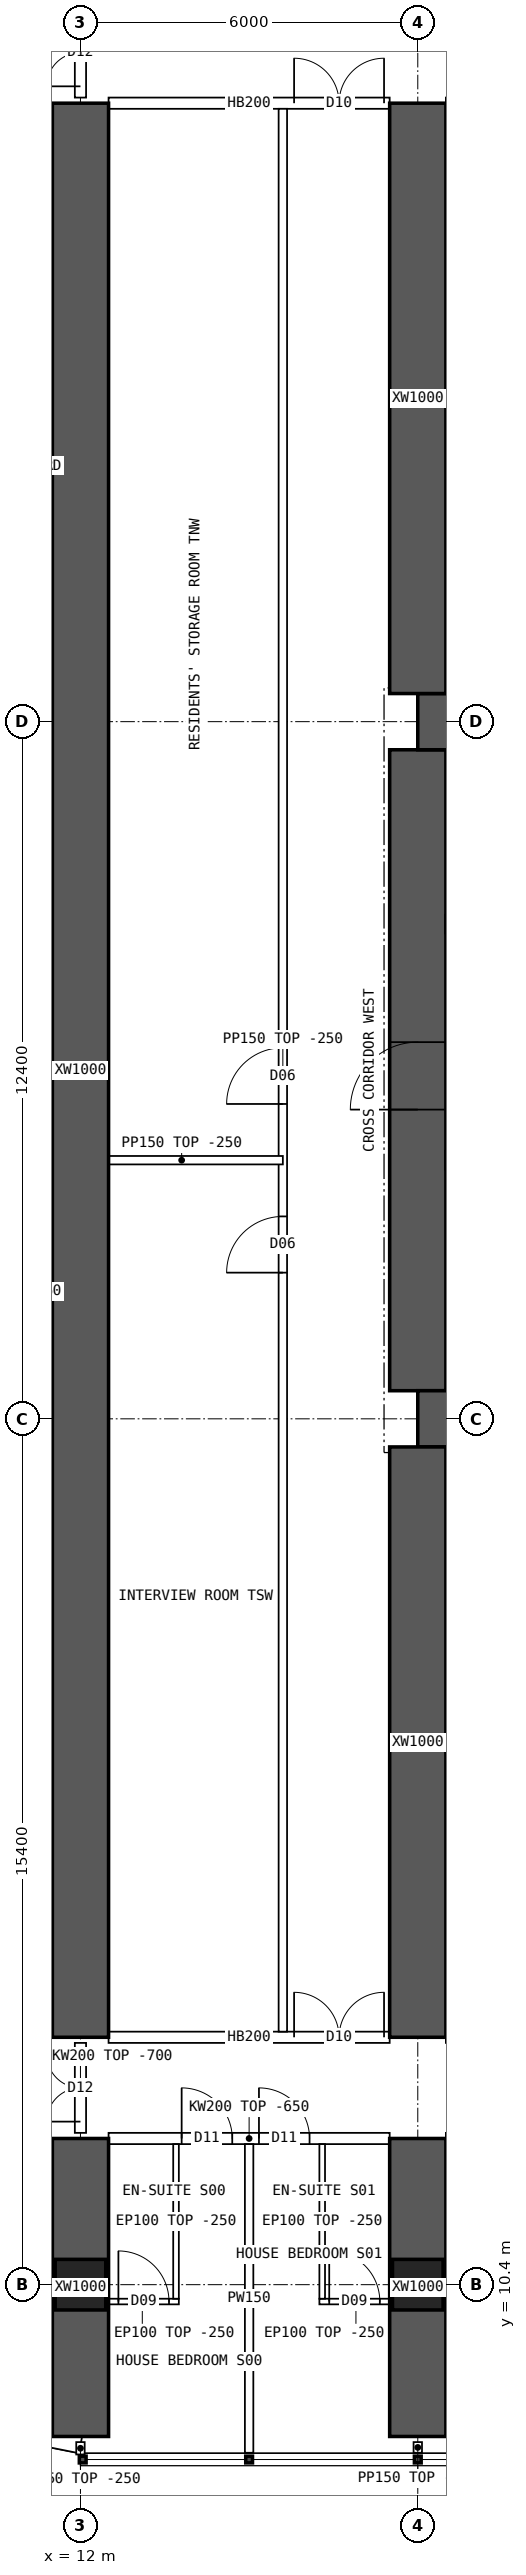
"""IFC4 building model, lengths in metres.
Left out: names, types, materials, properties, quantities, classifications, styles, units other than length and angle.
Written with IfcOpenShell. Run it as: python <this file> out.ifc"""

import sys

from ifc_helpers import new_model, si_unit, direction, frame, frame_2d, origin, origin_2d, place, context, subcontext, project, spatial, polyline, rectangle, hollow_rectangle, outline, extrude, element, fill, save


model = new_model("IFC4")
c1 = context("Model", 3, precision=1e-05, world=origin(), true_north=direction((0.0, 1.0)))
c2 = subcontext(c1, "Body", "Model", "MODEL_VIEW")
j1 = project(units=[si_unit("LENGTHUNIT", "METRE"), si_unit("PLANEANGLEUNIT", "RADIAN")], contexts=[c1])
p1 = place(None, origin())
s1 = spatial("IfcSite", under=j1, at=p1, CompositionType="ELEMENT")
p2 = place(p1, origin())
s2 = spatial("IfcBuilding", under=s1, at=p2, CompositionType="ELEMENT")
p3 = place(p2, frame((0.0, 0.0, 42.7)))
s3 = spatial("IfcBuildingStorey", under=s2, at=p3, CompositionType="ELEMENT", Elevation=42.7)
for number, where, z_axis, x_axis in (
    (1, (12.0, 10.4, 0.0), (0.0, 0.0, 1.0), (1.0, 0.0, 0.0)),
    (2, (18.0, 10.4, 0.0), (0.0, 0.0, 1.0), (1.0, 0.0, 0.0)),
):
    element("IfcColumn", number, at=place(p3, frame(where, z_axis=z_axis, x_axis=x_axis)), inside=s3, PredefinedType="COLUMN", context=c2, shape_type="SweptSolid", body=[
        extrude(hollow_rectangle(XDim=0.9, YDim=0.9, WallThickness=0.09, at=origin_2d()), origin(), (0.0, 0.0, 1.0), 3.75),
    ])
for number, where, z_axis, x_axis in (
    (3, (18.0, 25.8, 0.0), (0.0, 0.0, 1.0), (1.0, 0.0, 0.0)),
    (4, (18.0, 38.2, 0.0), (0.0, 0.0, 1.0), (1.0, 0.0, 0.0)),
):
    element("IfcWall", number, at=place(p3, frame(where, z_axis=z_axis, x_axis=x_axis)), inside=s3, PredefinedType="SHEAR", context=c2, shape_type="SweptSolid", body=[
        extrude(rectangle(XDim=48.0, YDim=1.0, at=frame_2d((24.0, 0.0))), origin(), (0.0, 0.0, 1.0), 3.75),
    ])
p4 = place(p3, frame((18.0, 26.3, 0.0), z_axis=(0.0, 0.0, 1.0), x_axis=(0.0, 1.0, 0.0)))
e5 = element("IfcWall", 5, at=p4, inside=s3, PredefinedType="SHEAR", context=c2, shape_type="SweptSolid", body=[
    extrude(rectangle(XDim=11.4, YDim=1.0, at=frame_2d((5.7, 0.0))), origin(), (0.0, 0.0, 1.0), 3.75),
])
p5 = place(p4, frame((5.0, 0.0, 0.0)))
e6 = element("IfcOpeningElement", 6, at=p5, cuts=e5, PredefinedType="OPENING", context=c2, shape_type="SweptSolid", body=[
    extrude(rectangle(XDim=1.2, YDim=2.1, at=frame_2d((0.6, 1.05))), frame((0.0, 0.51, 0.0), z_axis=(0.0, -1.0, 0.0), x_axis=(1.0, 0.0, 0.0)), (0.0, 0.0, 1.0), 1.02),
])
p6 = place(p3, frame((12.0, 7.7, 0.0), z_axis=(0.0, 0.0, 1.0), x_axis=(0.0, 1.0, 0.0)))
e7 = element("IfcWall", 7, at=p6, inside=s3, PredefinedType="SHEAR", context=c2, shape_type="SweptSolid", body=[
    extrude(rectangle(XDim=5.3, YDim=1.0, at=frame_2d((2.65, 0.0))), origin(), (0.0, 0.0, 1.0), 3.75),
])
p7 = place(p3, frame((12.0, 14.8, 0.0), z_axis=(0.0, 0.0, 1.0), x_axis=(0.0, 1.0, 0.0)))
e8 = element("IfcWall", 8, at=p7, inside=s3, PredefinedType="SHEAR", context=c2, shape_type="SweptSolid", body=[
    extrude(rectangle(XDim=34.4, YDim=1.0, at=frame_2d((17.2, 0.0))), origin(), (0.0, 0.0, 1.0), 3.75),
])
p8 = place(p3, frame((18.0, 7.7, 0.0), z_axis=(0.0, 0.0, 1.0), x_axis=(0.0, 1.0, 0.0)))
e9 = element("IfcWall", 9, at=p8, inside=s3, PredefinedType="SHEAR", context=c2, shape_type="SweptSolid", body=[
    extrude(rectangle(XDim=5.3, YDim=1.0, at=frame_2d((2.65, 0.0))), origin(), (0.0, 0.0, 1.0), 3.75),
])
for number, where, z_axis, x_axis in (
    (10, (18.0, 14.8, 0.0), (0.0, 0.0, 1.0), (0.0, 1.0, 0.0)),
    (11, (18.0, 38.7, 0.0), (0.0, 0.0, 1.0), (0.0, 1.0, 0.0)),
):
    element("IfcWall", number, at=place(p3, frame(where, z_axis=z_axis, x_axis=x_axis)), inside=s3, PredefinedType="SHEAR", context=c2, shape_type="SweptSolid", body=[
        extrude(rectangle(XDim=10.5, YDim=1.0, at=frame_2d((5.25, 0.0))), origin(), (0.0, 0.0, 1.0), 3.75),
    ])
p9 = place(p3, frame((8.843, 8.178, 0.0), z_axis=(0.0, 0.0, 1.0), x_axis=(0.980787251524, -0.195080412259, 0.0)))
e12 = element("IfcWall", 12, at=p9, inside=s3, PredefinedType="SOLIDWALL", context=c2, shape_type="SweptSolid", body=[
    extrude(outline(polyline([(-0.03, -0.15), (3.249, -0.15), (3.189, 0.15), (0.03, 0.15), (-0.03, -0.15)])), origin(), (0.0, 0.0, 1.0), 3.5),
])
p10 = place(p9, frame((0.909, 0.0, 0.9)))
e13 = element("IfcOpeningElement", 13, at=p10, cuts=e12, PredefinedType="OPENING", context=c2, shape_type="SweptSolid", body=[
    extrude(rectangle(XDim=1.4, YDim=1.8, at=frame_2d((0.7, 0.9))), frame((0.0, 0.16, 0.0), z_axis=(0.0, -1.0, 0.0), x_axis=(1.0, 0.0, 0.0)), (0.0, 0.0, 1.0), 0.32),
])
p11 = place(p3, frame((12.5, 13.0, 0.0), z_axis=(0.0, 0.0, 1.0), x_axis=(1.0, 0.0, 0.0)))
e14 = element("IfcWall", 14, at=p11, inside=s3, PredefinedType="SOLIDWALL", context=c2, shape_type="SweptSolid", body=[
    extrude(outline(polyline([(0.0, 0.0), (5.0, 0.0), (5.0, 3.1), (0.0, 3.1), (0.0, 0.0)])), frame((0.0, 0.1, 0.0), z_axis=(0.0, -1.0, 0.0), x_axis=(1.0, 0.0, 0.0)), (0.0, 0.0, 1.0), 0.2),
])
p12 = place(p11, frame((1.3, 0.0, 0.0)))
e15 = element("IfcOpeningElement", 15, at=p12, cuts=e14, PredefinedType="OPENING", context=c2, shape_type="SweptSolid", body=[
    extrude(rectangle(XDim=0.9, YDim=2.1, at=frame_2d((0.45, 1.05))), frame((0.0, 0.11, 0.0), z_axis=(0.0, -1.0, 0.0), x_axis=(1.0, 0.0, 0.0)), (0.0, 0.0, 1.0), 0.22),
])
p13 = place(p11, frame((2.675, 0.0, 0.0)))
e16 = element("IfcOpeningElement", 16, at=p13, cuts=e14, PredefinedType="OPENING", context=c2, shape_type="SweptSolid", body=[
    extrude(rectangle(XDim=0.9, YDim=2.1, at=frame_2d((0.45, 1.05))), frame((0.0, 0.11, 0.0), z_axis=(0.0, -1.0, 0.0), x_axis=(1.0, 0.0, 0.0)), (0.0, 0.0, 1.0), 0.22),
])
p14 = place(p3, frame((12.5, 14.8, 0.0), z_axis=(0.0, 0.0, 1.0), x_axis=(1.0, 0.0, 0.0)))
e17 = element("IfcWall", 17, at=p14, inside=s3, PredefinedType="SOLIDWALL", context=c2, shape_type="SweptSolid", body=[
    extrude(rectangle(XDim=5.0, YDim=0.2, at=frame_2d((2.5, 0.0))), origin(), (0.0, 0.0, 1.0), 3.5),
])
p15 = place(p14, frame((3.3, 0.0, 0.0)))
e18 = element("IfcOpeningElement", 18, at=p15, cuts=e17, PredefinedType="OPENING", context=c2, shape_type="SweptSolid", body=[
    extrude(rectangle(XDim=1.6, YDim=2.1, at=frame_2d((0.8, 1.05))), frame((0.0, 0.11, 0.0), z_axis=(0.0, -1.0, 0.0), x_axis=(1.0, 0.0, 0.0)), (0.0, 0.0, 1.0), 0.22),
])
p16 = place(p3, frame((12.5, 49.2, 0.0), z_axis=(0.0, 0.0, 1.0), x_axis=(1.0, 0.0, 0.0)))
e19 = element("IfcWall", 19, at=p16, inside=s3, PredefinedType="SOLIDWALL", context=c2, shape_type="SweptSolid", body=[
    extrude(rectangle(XDim=5.0, YDim=0.2, at=frame_2d((2.5, 0.0))), origin(), (0.0, 0.0, 1.0), 3.5),
])
p17 = place(p16, frame((3.3, 0.0, 0.0)))
e20 = element("IfcOpeningElement", 20, at=p17, cuts=e19, PredefinedType="OPENING", context=c2, shape_type="SweptSolid", body=[
    extrude(rectangle(XDim=1.6, YDim=2.1, at=frame_2d((0.8, 1.05))), frame((0.0, 0.11, 0.0), z_axis=(0.0, -1.0, 0.0), x_axis=(1.0, 0.0, 0.0)), (0.0, 0.0, 1.0), 0.22),
])
p18 = place(p3, frame((15.0, 7.41, 0.0), z_axis=(0.0, 0.0, 1.0), x_axis=(0.0, 1.0, 0.0)))
e21 = element("IfcWall", 21, at=p18, inside=s3, PredefinedType="PARTITIONING", context=c2, shape_type="SweptSolid", body=[
    extrude(outline(polyline([(0.0, 0.0), (5.49, 0.0), (5.49, 3.1), (5.442, 3.1), (5.44, 3.5), (3.192, 3.5), (3.19, 3.1), (2.792, 3.1), (2.79, 3.5), (0.0, 3.5), (0.0, 0.0)])), frame((0.0, 0.075, 0.0), z_axis=(0.0, -1.0, 0.0), x_axis=(1.0, 0.0, 0.0)), (0.0, 0.0, 1.0), 0.15),
])
p19 = place(p3, frame((13.75, 10.1, 0.0), z_axis=(0.0, 0.0, 1.0), x_axis=(-1.0, 0.0, 0.0)))
e22 = element("IfcWall", 22, at=p19, inside=s3, PredefinedType="PARTITIONING", context=c2, shape_type="SweptSolid", body=[
    extrude(rectangle(XDim=1.3, YDim=0.1, at=frame_2d((0.65, 0.0))), origin(), (0.0, 0.0, 1.0), 3.5),
])
p20 = place(p19, frame((0.175, 0.0, 0.0)))
e23 = element("IfcOpeningElement", 23, at=p20, cuts=e22, PredefinedType="OPENING", context=c2, shape_type="SweptSolid", body=[
    extrude(rectangle(XDim=0.9, YDim=2.1, at=frame_2d((0.45, 1.05))), frame((0.0, 0.06, 0.0), z_axis=(0.0, -1.0, 0.0), x_axis=(1.0, 0.0, 0.0)), (0.0, 0.0, 1.0), 0.12),
])
p21 = place(p3, frame((13.7, 10.15, 0.0), z_axis=(0.0, 0.0, 1.0), x_axis=(0.0, 1.0, 0.0)))
e24 = element("IfcWall", 24, at=p21, inside=s3, PredefinedType="PARTITIONING", context=c2, shape_type="SweptSolid", body=[
    extrude(outline(polyline([(0.0, 0.0), (2.75, 0.0), (2.75, 3.1), (2.702, 3.1), (2.7, 3.5), (0.452, 3.5), (0.45, 3.1), (0.052, 3.1), (0.05, 3.5), (0.0, 3.5), (0.0, 0.0)])), frame((0.0, 0.05, 0.0), z_axis=(0.0, -1.0, 0.0), x_axis=(1.0, 0.0, 0.0)), (0.0, 0.0, 1.0), 0.1),
])
p22 = place(p3, frame((17.55, 10.1, 0.0), z_axis=(0.0, 0.0, 1.0), x_axis=(-1.0, 0.0, 0.0)))
e25 = element("IfcWall", 25, at=p22, inside=s3, PredefinedType="PARTITIONING", context=c2, shape_type="SweptSolid", body=[
    extrude(rectangle(XDim=1.3, YDim=0.1, at=frame_2d((0.65, 0.0))), origin(), (0.0, 0.0, 1.0), 3.5),
])
p23 = place(p22, frame((0.225, 0.0, 0.0)))
e26 = element("IfcOpeningElement", 26, at=p23, cuts=e25, PredefinedType="OPENING", context=c2, shape_type="SweptSolid", body=[
    extrude(rectangle(XDim=0.9, YDim=2.1, at=frame_2d((0.45, 1.05))), frame((0.0, 0.06, 0.0), z_axis=(0.0, -1.0, 0.0), x_axis=(1.0, 0.0, 0.0)), (0.0, 0.0, 1.0), 0.12),
])
p24 = place(p3, frame((16.3, 10.15, 0.0), z_axis=(0.0, 0.0, 1.0), x_axis=(0.0, 1.0, 0.0)))
e27 = element("IfcWall", 27, at=p24, inside=s3, PredefinedType="PARTITIONING", context=c2, shape_type="SweptSolid", body=[
    extrude(outline(polyline([(0.0, 0.0), (2.75, 0.0), (2.75, 3.1), (2.702, 3.1), (2.7, 3.5), (0.452, 3.5), (0.45, 3.1), (0.052, 3.1), (0.05, 3.5), (0.0, 3.5), (0.0, 0.0)])), frame((0.0, 0.05, 0.0), z_axis=(0.0, -1.0, 0.0), x_axis=(1.0, 0.0, 0.0)), (0.0, 0.0, 1.0), 0.1),
])
p25 = place(p3, frame((15.6, 14.9, 0.0), z_axis=(0.0, 0.0, 1.0), x_axis=(0.0, 1.0, 0.0)))
e28 = element("IfcWall", 28, at=p25, inside=s3, PredefinedType="PARTITIONING", context=c2, shape_type="SweptSolid", body=[
    extrude(rectangle(XDim=34.2, YDim=0.15, at=frame_2d((17.1, 0.0))), origin(), (0.0, 0.0, 1.0), 3.5),
])
p26 = place(p25, frame((13.5, 0.0, 0.0)))
e29 = element("IfcOpeningElement", 29, at=p26, cuts=e28, PredefinedType="OPENING", context=c2, shape_type="SweptSolid", body=[
    extrude(rectangle(XDim=1.0, YDim=2.1, at=frame_2d((0.5, 1.05))), frame((0.0, 0.085, 0.0), z_axis=(0.0, -1.0, 0.0), x_axis=(1.0, 0.0, 0.0)), (0.0, 0.0, 1.0), 0.17),
])
p27 = place(p25, frame((16.5, 0.0, 0.0)))
e30 = element("IfcOpeningElement", 30, at=p27, cuts=e28, PredefinedType="OPENING", context=c2, shape_type="SweptSolid", body=[
    extrude(rectangle(XDim=1.0, YDim=2.1, at=frame_2d((0.5, 1.05))), frame((0.0, 0.085, 0.0), z_axis=(0.0, -1.0, 0.0), x_axis=(1.0, 0.0, 0.0)), (0.0, 0.0, 1.0), 0.17),
])
p28 = place(p3, frame((12.0, 30.4, 0.0), z_axis=(0.0, 0.0, 1.0), x_axis=(1.0, 0.0, 0.0)))
e31 = element("IfcWall", 31, at=p28, inside=s3, PredefinedType="PARTITIONING", context=c2, shape_type="SweptSolid", body=[
    extrude(rectangle(XDim=3.6, YDim=0.15, at=frame_2d((1.8, 0.0))), origin(), (0.0, 0.0, 1.0), 3.5),
])
p29 = place(p3, frame((3.905, 30.85, 0.0), z_axis=(0.0, 0.0, 1.0), x_axis=(1.0, 0.0, 0.0)))
e32 = element("IfcWall", 32, at=p29, inside=s3, PredefinedType="PARTITIONING", context=c2, shape_type="SweptSolid", body=[
    extrude(outline(polyline([(0.0, 0.0), (8.02, 0.0), (8.02, 3.5), (2.397, 3.5), (2.395, 3.05), (1.797, 3.05), (1.795, 3.5), (0.0, 3.5), (0.0, 0.0)])), frame((0.0, 0.075, 0.0), z_axis=(0.0, -1.0, 0.0), x_axis=(1.0, 0.0, 0.0)), (0.0, 0.0, 1.0), 0.15),
])
p30 = place(p3, frame((12.0, 13.1, 0.0), z_axis=(0.0, 0.0, 1.0), x_axis=(0.0, 1.0, 0.0)))
e33 = element("IfcWall", 33, at=p30, inside=s3, PredefinedType="SOLIDWALL", context=c2, shape_type="SweptSolid", body=[
    extrude(outline(polyline([(0.0, 0.0), (1.6, 0.0), (1.6, 3.05), (0.0, 3.05), (0.0, 0.0)])), frame((0.0, 0.1, 0.0), z_axis=(0.0, -1.0, 0.0), x_axis=(1.0, 0.0, 0.0)), (0.0, 0.0, 1.0), 0.2),
])
p31 = place(p30, frame((0.2, 0.0, 0.0)))
e34 = element("IfcOpeningElement", 34, at=p31, cuts=e33, PredefinedType="OPENING", context=c2, shape_type="SweptSolid", body=[
    extrude(rectangle(XDim=1.2, YDim=2.1, at=frame_2d((0.6, 1.05))), frame((0.0, 0.11, 0.0), z_axis=(0.0, -1.0, 0.0), x_axis=(1.0, 0.0, 0.0)), (0.0, 0.0, 1.0), 0.22),
])
p32 = place(p3, frame((12.0, 49.3, 0.0), z_axis=(0.0, 0.0, 1.0), x_axis=(0.0, 1.0, 0.0)))
e35 = element("IfcWall", 35, at=p32, inside=s3, PredefinedType="SOLIDWALL", context=c2, shape_type="SweptSolid", body=[
    extrude(outline(polyline([(0.0, 0.0), (1.6, 0.0), (1.6, 3.05), (0.0, 3.05), (0.0, 0.0)])), frame((0.0, 0.1, 0.0), z_axis=(0.0, -1.0, 0.0), x_axis=(1.0, 0.0, 0.0)), (0.0, 0.0, 1.0), 0.2),
])
p33 = place(p32, frame((0.2, 0.0, 0.0)))
e36 = element("IfcOpeningElement", 36, at=p33, cuts=e35, PredefinedType="OPENING", context=c2, shape_type="SweptSolid", body=[
    extrude(rectangle(XDim=1.2, YDim=2.1, at=frame_2d((0.6, 1.05))), frame((0.0, 0.11, 0.0), z_axis=(0.0, -1.0, 0.0), x_axis=(1.0, 0.0, 0.0)), (0.0, 0.0, 1.0), 0.22),
])
p34 = place(p3, frame((12.0, 7.6, 0.0), z_axis=(0.0, 0.0, 1.0), x_axis=(0.0, -1.0, 0.0)))
e37 = element("IfcWall", 37, at=p34, inside=s3, PredefinedType="PARTITIONING", context=c2, shape_type="SweptSolid", body=[
    extrude(rectangle(XDim=0.22, YDim=0.15, at=frame_2d((0.11, 0.0))), origin(), (0.0, 0.0, 1.0), 3.5),
])
p35 = place(p3, frame((18.0, 7.6, 0.0), z_axis=(0.0, 0.0, 1.0), x_axis=(0.0, -1.0, 0.0)))
e38 = element("IfcWall", 38, at=p35, inside=s3, PredefinedType="PARTITIONING", context=c2, shape_type="SweptSolid", body=[
    extrude(rectangle(XDim=0.19, YDim=0.15, at=frame_2d((0.095, 0.0))), origin(), (0.0, 0.0, 1.0), 3.5),
])
p36 = place(p5, origin())
e39 = element("IfcDoor", 39, at=p36, inside=s3, OperationType="SINGLE_SWING_LEFT", PredefinedType="DOOR", context=c2, shape_type="SweptSolid", body=[
    extrude(rectangle(XDim=1.2, YDim=2.1, at=frame_2d((0.6, 1.05))), frame((0.0, 0.025, 0.0), z_axis=(0.0, -1.0, 0.0), x_axis=(1.0, 0.0, 0.0)), (0.0, 0.0, 1.0), 0.05),
])
fill(e6, e39)
p37 = place(p15, origin())
e40 = element("IfcDoor", 40, at=p37, inside=s3, OperationType="DOUBLE_DOOR_SINGLE_SWING", PredefinedType="DOOR", context=c2, shape_type="SweptSolid", body=[
    extrude(rectangle(XDim=1.6, YDim=2.1, at=frame_2d((0.8, 1.05))), frame((0.0, 0.025, 0.0), z_axis=(0.0, -1.0, 0.0), x_axis=(1.0, 0.0, 0.0)), (0.0, 0.0, 1.0), 0.05),
])
fill(e18, e40)
p38 = place(p17, origin())
e41 = element("IfcDoor", 41, at=p38, inside=s3, OperationType="DOUBLE_DOOR_SINGLE_SWING", PredefinedType="DOOR", context=c2, shape_type="SweptSolid", body=[
    extrude(rectangle(XDim=1.6, YDim=2.1, at=frame_2d((0.8, 1.05))), frame((0.0, 0.025, 0.0), z_axis=(0.0, -1.0, 0.0), x_axis=(1.0, 0.0, 0.0)), (0.0, 0.0, 1.0), 0.05),
])
fill(e20, e41)
p39 = place(p20, origin())
e42 = element("IfcDoor", 42, at=p39, inside=s3, OperationType="SINGLE_SWING_RIGHT", PredefinedType="DOOR", context=c2, shape_type="SweptSolid", body=[
    extrude(rectangle(XDim=0.9, YDim=2.1, at=frame_2d((0.45, 1.05))), frame((0.0, 0.025, 0.0), z_axis=(0.0, -1.0, 0.0), x_axis=(1.0, 0.0, 0.0)), (0.0, 0.0, 1.0), 0.05),
])
fill(e23, e42)
p40 = place(p12, origin())
e43 = element("IfcDoor", 43, at=p40, inside=s3, OperationType="SINGLE_SWING_LEFT", PredefinedType="DOOR", context=c2, shape_type="SweptSolid", body=[
    extrude(rectangle(XDim=0.9, YDim=2.1, at=frame_2d((0.45, 1.05))), frame((0.0, 0.025, 0.0), z_axis=(0.0, -1.0, 0.0), x_axis=(1.0, 0.0, 0.0)), (0.0, 0.0, 1.0), 0.05),
])
fill(e15, e43)
p41 = place(p23, origin())
e44 = element("IfcDoor", 44, at=p41, inside=s3, OperationType="SINGLE_SWING_RIGHT", PredefinedType="DOOR", context=c2, shape_type="SweptSolid", body=[
    extrude(rectangle(XDim=0.9, YDim=2.1, at=frame_2d((0.45, 1.05))), frame((0.0, 0.025, 0.0), z_axis=(0.0, -1.0, 0.0), x_axis=(1.0, 0.0, 0.0)), (0.0, 0.0, 1.0), 0.05),
])
fill(e26, e44)
p42 = place(p13, origin())
e45 = element("IfcDoor", 45, at=p42, inside=s3, OperationType="SINGLE_SWING_LEFT", PredefinedType="DOOR", context=c2, shape_type="SweptSolid", body=[
    extrude(rectangle(XDim=0.9, YDim=2.1, at=frame_2d((0.45, 1.05))), frame((0.0, 0.025, 0.0), z_axis=(0.0, -1.0, 0.0), x_axis=(1.0, 0.0, 0.0)), (0.0, 0.0, 1.0), 0.05),
])
fill(e16, e45)
p43 = place(p26, origin())
e46 = element("IfcDoor", 46, at=p43, inside=s3, OperationType="SINGLE_SWING_LEFT", PredefinedType="DOOR", context=c2, shape_type="SweptSolid", body=[
    extrude(rectangle(XDim=1.0, YDim=2.1, at=frame_2d((0.5, 1.05))), frame((0.0, 0.025, 0.0), z_axis=(0.0, -1.0, 0.0), x_axis=(1.0, 0.0, 0.0)), (0.0, 0.0, 1.0), 0.05),
])
fill(e29, e46)
p44 = place(p27, origin())
e47 = element("IfcDoor", 47, at=p44, inside=s3, OperationType="SINGLE_SWING_LEFT", PredefinedType="DOOR", context=c2, shape_type="SweptSolid", body=[
    extrude(rectangle(XDim=1.0, YDim=2.1, at=frame_2d((0.5, 1.05))), frame((0.0, 0.025, 0.0), z_axis=(0.0, -1.0, 0.0), x_axis=(1.0, 0.0, 0.0)), (0.0, 0.0, 1.0), 0.05),
])
fill(e30, e47)
p45 = place(p31, origin())
e48 = element("IfcDoor", 48, at=p45, inside=s3, OperationType="DOUBLE_DOOR_SINGLE_SWING", PredefinedType="DOOR", context=c2, shape_type="SweptSolid", body=[
    extrude(rectangle(XDim=1.2, YDim=2.1, at=frame_2d((0.6, 1.05))), frame((0.0, 0.025, 0.0), z_axis=(0.0, -1.0, 0.0), x_axis=(1.0, 0.0, 0.0)), (0.0, 0.0, 1.0), 0.05),
])
fill(e34, e48)
p46 = place(p33, origin())
e49 = element("IfcDoor", 49, at=p46, inside=s3, OperationType="DOUBLE_DOOR_SINGLE_SWING", PredefinedType="DOOR", context=c2, shape_type="SweptSolid", body=[
    extrude(rectangle(XDim=1.2, YDim=2.1, at=frame_2d((0.6, 1.05))), frame((0.0, 0.025, 0.0), z_axis=(0.0, -1.0, 0.0), x_axis=(1.0, 0.0, 0.0)), (0.0, 0.0, 1.0), 0.05),
])
fill(e36, e49)
save(model, sys.argv[1])
